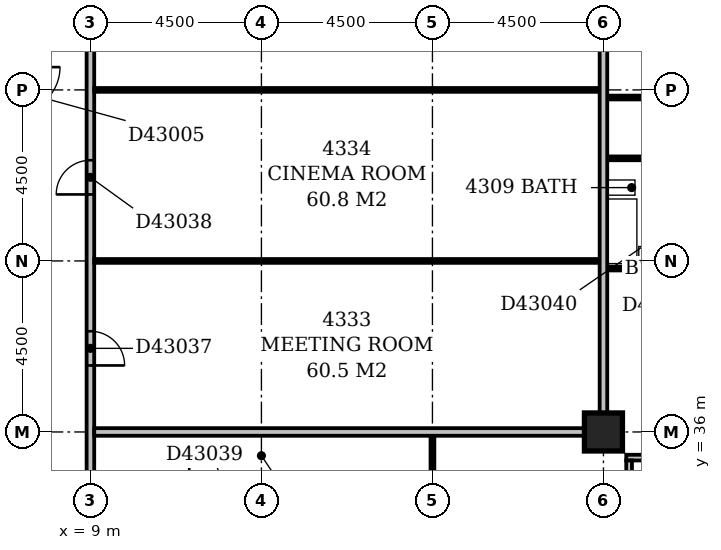
"""IFC4 building model, lengths in metres.
Left out: names, types, materials, properties, quantities, classifications, styles, units other than length and angle.
Written with IfcOpenShell. Run it as: python <this file> out.ifc"""

import sys

from ifc_helpers import new_model, si_unit, direction, frame, frame_2d, origin, origin_2d, place, context, subcontext, project, spatial, rectangle, extrude, element, fill, save


model = new_model("IFC4")
c1 = context("Model", 3, precision=1e-05, world=origin(), true_north=direction((0.0, 1.0)))
c2 = subcontext(c1, "Body", "Model", "MODEL_VIEW")
j1 = project(units=[si_unit("LENGTHUNIT", "METRE"), si_unit("PLANEANGLEUNIT", "RADIAN")], contexts=[c1])
p1 = place(None, origin())
s1 = spatial("IfcSite", under=j1, at=p1, CompositionType="ELEMENT")
p2 = place(p1, origin())
s2 = spatial("IfcBuilding", under=s1, at=p2, CompositionType="ELEMENT")
p3 = place(p2, frame((0.0, 0.0, 170.0)))
s3 = spatial("IfcBuildingStorey", under=s2, at=p3, CompositionType="ELEMENT", Elevation=170.0)
p4 = place(p3, frame((22.5, 36.0, -0.3), z_axis=(0.0, 0.0, 1.0), x_axis=(1.0, 0.0, 0.0)))
e1 = element("IfcColumn", 1, at=p4, inside=s3, PredefinedType="COLUMN", context=c2, shape_type="SweptSolid", body=[
    extrude(rectangle(XDim=1.0, YDim=1.0, at=origin_2d()), origin(), (0.0, 0.0, 1.0), 3.45),
])
p5 = place(p3, frame((23.175, 17.4, 0.0), z_axis=(0.0, 0.0, 1.0), x_axis=(0.0, 1.0, 0.0)))
e2 = element("IfcWall", 2, at=p5, inside=s3, PredefinedType="STANDARD", context=c2, shape_type="SweptSolid", body=[
    extrude(rectangle(XDim=17.85, YDim=0.15, at=frame_2d((8.925, 0.0))), origin(), (0.0, 0.0, 1.0), 2.5),
])
p6 = place(p5, frame((1.65, 0.0, 0.6)))
e3 = element("IfcOpeningElement", 3, at=p6, cuts=e2, PredefinedType="OPENING", context=c2, shape_type="SweptSolid", body=[
    extrude(rectangle(XDim=2.4, YDim=1.8, at=frame_2d((1.2, 0.9))), frame((0.0, 0.087, 0.0), z_axis=(0.0, -1.0, 0.0), x_axis=(1.0, 0.0, 0.0)), (0.0, 0.0, 1.0), 0.174),
])
p7 = place(p5, frame((6.15, 0.0, 0.6)))
e4 = element("IfcOpeningElement", 4, at=p7, cuts=e2, PredefinedType="OPENING", context=c2, shape_type="SweptSolid", body=[
    extrude(rectangle(XDim=2.4, YDim=1.8, at=frame_2d((1.2, 0.9))), frame((0.0, 0.087, 0.0), z_axis=(0.0, -1.0, 0.0), x_axis=(1.0, 0.0, 0.0)), (0.0, 0.0, 1.0), 0.174),
])
p8 = place(p5, frame((11.875, 0.0, 0.6)))
e5 = element("IfcOpeningElement", 5, at=p8, cuts=e2, PredefinedType="OPENING", context=c2, shape_type="SweptSolid", body=[
    extrude(rectangle(XDim=1.5, YDim=1.8, at=frame_2d((0.75, 0.9))), frame((0.0, 0.087, 0.0), z_axis=(0.0, -1.0, 0.0), x_axis=(1.0, 0.0, 0.0)), (0.0, 0.0, 1.0), 0.174),
])
p9 = place(p5, frame((15.15, 0.0, 0.6)))
e6 = element("IfcOpeningElement", 6, at=p9, cuts=e2, PredefinedType="OPENING", context=c2, shape_type="SweptSolid", body=[
    extrude(rectangle(XDim=2.4, YDim=1.8, at=frame_2d((1.2, 0.9))), frame((0.0, 0.087, 0.0), z_axis=(0.0, -1.0, 0.0), x_axis=(1.0, 0.0, 0.0)), (0.0, 0.0, 1.0), 0.174),
])
p10 = place(p3, frame((23.1, 35.325, 0.0), z_axis=(0.0, 0.0, 1.0), x_axis=(1.0, 0.0, 0.0)))
e7 = element("IfcWall", 7, at=p10, inside=s3, PredefinedType="STANDARD", context=c2, shape_type="SweptSolid", body=[
    extrude(rectangle(XDim=45.15, YDim=0.15, at=frame_2d((22.575, 0.0))), origin(), (0.0, 0.0, 1.0), 2.5),
])
p11 = place(p10, frame((0.45, 0.0, 0.6)))
e8 = element("IfcOpeningElement", 8, at=p11, cuts=e7, PredefinedType="OPENING", context=c2, shape_type="SweptSolid", body=[
    extrude(rectangle(XDim=2.4, YDim=1.8, at=frame_2d((1.2, 0.9))), frame((0.0, 0.087, 0.0), z_axis=(0.0, -1.0, 0.0), x_axis=(1.0, 0.0, 0.0)), (0.0, 0.0, 1.0), 0.174),
])
p12 = place(p10, frame((4.684, 0.0, 0.6)))
e9 = element("IfcOpeningElement", 9, at=p12, cuts=e7, PredefinedType="OPENING", context=c2, shape_type="SweptSolid", body=[
    extrude(rectangle(XDim=2.4, YDim=1.8, at=frame_2d((1.2, 0.9))), frame((0.0, 0.087, 0.0), z_axis=(0.0, -1.0, 0.0), x_axis=(1.0, 0.0, 0.0)), (0.0, 0.0, 1.0), 0.174),
])
p13 = place(p10, frame((9.45, 0.0, 0.6)))
e10 = element("IfcOpeningElement", 10, at=p13, cuts=e7, PredefinedType="OPENING", context=c2, shape_type="SweptSolid", body=[
    extrude(rectangle(XDim=2.4, YDim=1.8, at=frame_2d((1.2, 0.9))), frame((0.0, 0.087, 0.0), z_axis=(0.0, -1.0, 0.0), x_axis=(1.0, 0.0, 0.0)), (0.0, 0.0, 1.0), 0.174),
])
p14 = place(p10, frame((13.95, 0.0, 0.6)))
e11 = element("IfcOpeningElement", 11, at=p14, cuts=e7, PredefinedType="OPENING", context=c2, shape_type="SweptSolid", body=[
    extrude(rectangle(XDim=2.4, YDim=1.8, at=frame_2d((1.2, 0.9))), frame((0.0, 0.087, 0.0), z_axis=(0.0, -1.0, 0.0), x_axis=(1.0, 0.0, 0.0)), (0.0, 0.0, 1.0), 0.174),
])
p15 = place(p10, frame((19.076, 0.0, 0.6)))
e12 = element("IfcOpeningElement", 12, at=p15, cuts=e7, PredefinedType="OPENING", context=c2, shape_type="SweptSolid", body=[
    extrude(rectangle(XDim=2.1, YDim=1.8, at=frame_2d((1.05, 0.9))), frame((0.0, 0.087, 0.0), z_axis=(0.0, -1.0, 0.0), x_axis=(1.0, 0.0, 0.0)), (0.0, 0.0, 1.0), 0.174),
])
p16 = place(p10, frame((22.95, 0.0, 0.6)))
e13 = element("IfcOpeningElement", 13, at=p16, cuts=e7, PredefinedType="OPENING", context=c2, shape_type="SweptSolid", body=[
    extrude(rectangle(XDim=2.4, YDim=1.8, at=frame_2d((1.2, 0.9))), frame((0.0, 0.087, 0.0), z_axis=(0.0, -1.0, 0.0), x_axis=(1.0, 0.0, 0.0)), (0.0, 0.0, 1.0), 0.174),
])
p17 = place(p10, frame((27.45, 0.0, 0.6)))
e14 = element("IfcOpeningElement", 14, at=p17, cuts=e7, PredefinedType="OPENING", context=c2, shape_type="SweptSolid", body=[
    extrude(rectangle(XDim=2.4, YDim=1.8, at=frame_2d((1.2, 0.9))), frame((0.0, 0.087, 0.0), z_axis=(0.0, -1.0, 0.0), x_axis=(1.0, 0.0, 0.0)), (0.0, 0.0, 1.0), 0.174),
])
p18 = place(p10, frame((31.95, 0.0, 0.6)))
e15 = element("IfcOpeningElement", 15, at=p18, cuts=e7, PredefinedType="OPENING", context=c2, shape_type="SweptSolid", body=[
    extrude(rectangle(XDim=2.4, YDim=1.8, at=frame_2d((1.2, 0.9))), frame((0.0, 0.087, 0.0), z_axis=(0.0, -1.0, 0.0), x_axis=(1.0, 0.0, 0.0)), (0.0, 0.0, 1.0), 0.174),
])
p19 = place(p10, frame((38.285, 0.0, 0.6)))
e16 = element("IfcOpeningElement", 16, at=p19, cuts=e7, PredefinedType="OPENING", context=c2, shape_type="SweptSolid", body=[
    extrude(rectangle(XDim=0.9, YDim=1.8, at=frame_2d((0.45, 0.9))), frame((0.0, 0.087, 0.0), z_axis=(0.0, -1.0, 0.0), x_axis=(1.0, 0.0, 0.0)), (0.0, 0.0, 1.0), 0.174),
])
p20 = place(p10, frame((40.95, 0.0, 0.6)))
e17 = element("IfcOpeningElement", 17, at=p20, cuts=e7, PredefinedType="OPENING", context=c2, shape_type="SweptSolid", body=[
    extrude(rectangle(XDim=2.4, YDim=1.8, at=frame_2d((1.2, 0.9))), frame((0.0, 0.087, 0.0), z_axis=(0.0, -1.0, 0.0), x_axis=(1.0, 0.0, 0.0)), (0.0, 0.0, 1.0), 0.174),
])
p21 = place(p3, frame((18.0, 31.6, 0.0), z_axis=(0.0, 0.0, 1.0), x_axis=(0.0, 1.0, 0.0)))
e18 = element("IfcWall", 18, at=p21, inside=s3, PredefinedType="PARTITIONING", context=c2, shape_type="SweptSolid", body=[
    extrude(rectangle(XDim=4.3, YDim=0.1, at=frame_2d((2.15, 0.0))), origin(), (0.0, 0.0, 1.0), 3.15),
])
p22 = place(p21, frame((1.7, 0.0, 0.0)))
e19 = element("IfcOpeningElement", 19, at=p22, cuts=e18, PredefinedType="OPENING", context=c2, shape_type="SweptSolid", body=[
    extrude(rectangle(XDim=0.9, YDim=2.1, at=frame_2d((0.45, 1.05))), frame((0.0, 0.062, 0.0), z_axis=(0.0, -1.0, 0.0), x_axis=(1.0, 0.0, 0.0)), (0.0, 0.0, 1.0), 0.124),
])
p23 = place(p3, frame((9.0, 34.75, 0.0), z_axis=(0.0, 0.0, 1.0), x_axis=(0.0, 1.0, 0.0)))
e20 = element("IfcWall", 20, at=p23, inside=s3, PredefinedType="PARTITIONING", context=c2, shape_type="SweptSolid", body=[
    extrude(rectangle(XDim=14.75, YDim=0.2, at=frame_2d((7.375, 0.0))), origin(), (0.0, 0.0, 1.0), 3.15),
])
p24 = place(p23, frame((3.0, 0.0, 0.0)))
e21 = element("IfcOpeningElement", 21, at=p24, cuts=e20, PredefinedType="OPENING", context=c2, shape_type="SweptSolid", body=[
    extrude(rectangle(XDim=0.9, YDim=2.1, at=frame_2d((0.45, 1.05))), frame((0.0, 0.112, 0.0), z_axis=(0.0, -1.0, 0.0), x_axis=(1.0, 0.0, 0.0)), (0.0, 0.0, 1.0), 0.224),
])
p25 = place(p23, frame((7.5, 0.0, 0.0)))
e22 = element("IfcOpeningElement", 22, at=p25, cuts=e20, PredefinedType="OPENING", context=c2, shape_type="SweptSolid", body=[
    extrude(rectangle(XDim=0.9, YDim=2.1, at=frame_2d((0.45, 1.05))), frame((0.0, 0.112, 0.0), z_axis=(0.0, -1.0, 0.0), x_axis=(1.0, 0.0, 0.0)), (0.0, 0.0, 1.0), 0.224),
])
for number, where, z_axis, x_axis in (
    (23, (9.1, 36.0, 0.0), (0.0, 0.0, 1.0), (1.0, 0.0, 0.0)),
    (24, (22.5, 36.5, 0.0), (0.0, 0.0, 1.0), (0.0, 1.0, 0.0)),
):
    element("IfcWall", number, at=place(p3, frame(where, z_axis=z_axis, x_axis=x_axis)), inside=s3, PredefinedType="PARTITIONING", context=c2, shape_type="SweptSolid", body=[
        extrude(rectangle(XDim=12.9, YDim=0.2, at=frame_2d((6.45, 0.0))), origin(), (0.0, 0.0, 1.0), 3.15),
    ])
p26 = place(p3, frame((22.6, 40.3, 0.0), z_axis=(0.0, 0.0, 1.0), x_axis=(1.0, 0.0, 0.0)))
e25 = element("IfcWall", 25, at=p26, inside=s3, PredefinedType="PLUMBINGWALL", context=c2, shape_type="SweptSolid", body=[
    extrude(rectangle(XDim=2.15, YDim=0.1, at=frame_2d((1.075, 0.0))), origin(), (0.0, 0.0, 1.0), 3.15),
])
p27 = place(p3, frame((9.1, 40.5, 0.0), z_axis=(0.0, 0.0, 1.0), x_axis=(1.0, 0.0, 0.0)))
e26 = element("IfcWall", 26, at=p27, inside=s3, PredefinedType="PARTITIONING", context=c2, shape_type="SweptSolid", body=[
    extrude(rectangle(XDim=13.3, YDim=0.1, at=frame_2d((6.65, 0.0))), origin(), (0.0, 0.0, 1.0), 3.15),
])
p28 = place(p3, frame((22.6, 43.2, 0.0), z_axis=(0.0, 0.0, 1.0), x_axis=(1.0, 0.0, 0.0)))
e27 = element("IfcWall", 27, at=p28, inside=s3, PredefinedType="PARTITIONING", context=c2, shape_type="SweptSolid", body=[
    extrude(rectangle(XDim=17.8, YDim=0.1, at=frame_2d((8.9, 0.0))), origin(), (0.0, 0.0, 1.0), 3.15),
])
p29 = place(p28, frame((2.85, 0.0, 0.0)))
e28 = element("IfcOpeningElement", 28, at=p29, cuts=e27, PredefinedType="OPENING", context=c2, shape_type="SweptSolid", body=[
    extrude(rectangle(XDim=0.9, YDim=2.1, at=frame_2d((0.45, 1.05))), frame((0.0, 0.062, 0.0), z_axis=(0.0, -1.0, 0.0), x_axis=(1.0, 0.0, 0.0)), (0.0, 0.0, 1.0), 0.124),
])
p30 = place(p28, frame((8.4, 0.0, 0.0)))
e29 = element("IfcOpeningElement", 29, at=p30, cuts=e27, PredefinedType="OPENING", context=c2, shape_type="SweptSolid", body=[
    extrude(rectangle(XDim=0.9, YDim=2.1, at=frame_2d((0.45, 1.05))), frame((0.0, 0.062, 0.0), z_axis=(0.0, -1.0, 0.0), x_axis=(1.0, 0.0, 0.0)), (0.0, 0.0, 1.0), 0.124),
])
p31 = place(p28, frame((14.05, 0.0, 0.0)))
e30 = element("IfcOpeningElement", 30, at=p31, cuts=e27, PredefinedType="OPENING", context=c2, shape_type="SweptSolid", body=[
    extrude(rectangle(XDim=0.9, YDim=2.1, at=frame_2d((0.45, 1.05))), frame((0.0, 0.062, 0.0), z_axis=(0.0, -1.0, 0.0), x_axis=(1.0, 0.0, 0.0)), (0.0, 0.0, 1.0), 0.124),
])
p32 = place(p3, frame((22.6, 44.8, 0.0), z_axis=(0.0, 0.0, 1.0), x_axis=(1.0, 0.0, 0.0)))
e31 = element("IfcWall", 31, at=p32, inside=s3, PredefinedType="PARTITIONING", context=c2, shape_type="SweptSolid", body=[
    extrude(rectangle(XDim=6.75, YDim=0.1, at=frame_2d((3.375, 0.0))), origin(), (0.0, 0.0, 1.0), 3.15),
])
p33 = place(p32, frame((2.9, 0.0, 0.0)))
e32 = element("IfcOpeningElement", 32, at=p33, cuts=e31, PredefinedType="OPENING", context=c2, shape_type="SweptSolid", body=[
    extrude(rectangle(XDim=0.9, YDim=2.1, at=frame_2d((0.45, 1.05))), frame((0.0, 0.062, 0.0), z_axis=(0.0, -1.0, 0.0), x_axis=(1.0, 0.0, 0.0)), (0.0, 0.0, 1.0), 0.124),
])
p34 = place(p3, frame((9.1, 45.0, 0.0), z_axis=(0.0, 0.0, 1.0), x_axis=(1.0, 0.0, 0.0)))
e33 = element("IfcWall", 33, at=p34, inside=s3, PredefinedType="PARTITIONING", context=c2, shape_type="SweptSolid", body=[
    extrude(rectangle(XDim=13.3, YDim=0.1, at=frame_2d((6.65, 0.0))), origin(), (0.0, 0.0, 1.0), 3.15),
])
p35 = place(p24, frame((0.9, 0.0, 0.0), z_axis=(0.0, 0.0, 1.0), x_axis=(-1.0, 0.0, 0.0)))
e34 = element("IfcDoor", 34, at=p35, inside=s3, OperationType="SINGLE_SWING_RIGHT", PredefinedType="DOOR", context=c2, shape_type="SweptSolid", body=[
    extrude(rectangle(XDim=0.9, YDim=2.1, at=frame_2d((0.45, 1.05))), frame((0.0, 0.025, 0.0), z_axis=(0.0, -1.0, 0.0), x_axis=(1.0, 0.0, 0.0)), (0.0, 0.0, 1.0), 0.05),
])
fill(e21, e34)
p36 = place(p25, origin())
e35 = element("IfcDoor", 35, at=p36, inside=s3, OperationType="SINGLE_SWING_LEFT", PredefinedType="DOOR", context=c2, shape_type="SweptSolid", body=[
    extrude(rectangle(XDim=0.9, YDim=2.1, at=frame_2d((0.45, 1.05))), frame((0.0, 0.025, 0.0), z_axis=(0.0, -1.0, 0.0), x_axis=(1.0, 0.0, 0.0)), (0.0, 0.0, 1.0), 0.05),
])
fill(e22, e35)
save(model, sys.argv[1])
